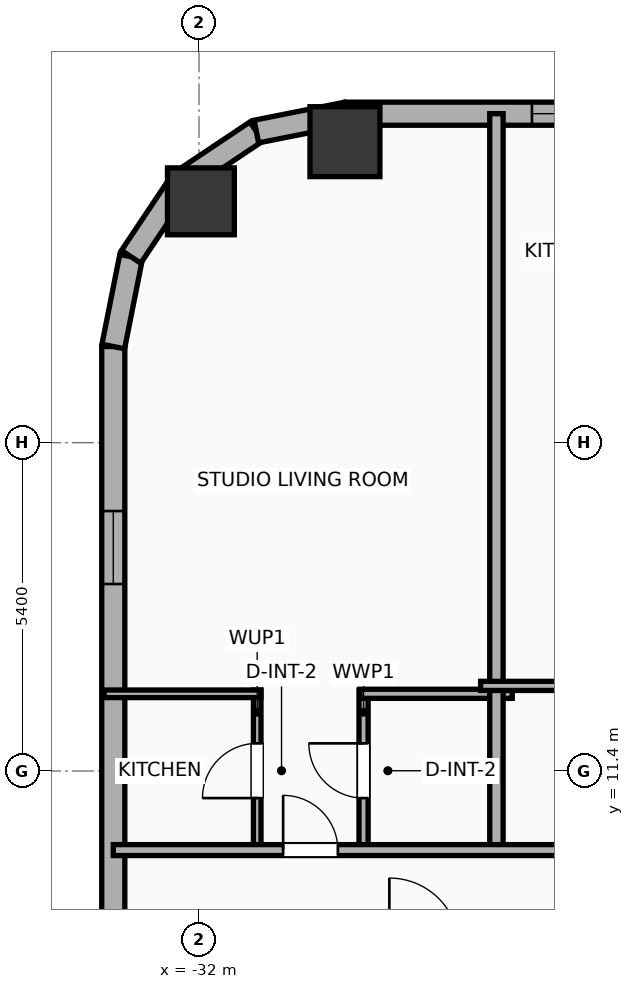
"""IFC4 building model, lengths in metres.
Left out: names, types, materials, properties, quantities, classifications, styles, units other than length and angle.
Written with IfcOpenShell. Run it as: python <this file> out.ifc"""

import sys

from ifc_helpers import new_model, si_unit, direction, frame, frame_2d, origin, origin_2d, place, context, subcontext, project, spatial, rectangle, hollow_rectangle, hollow_circle, extrude, element, fill, save


model = new_model("IFC4")
c1 = context("Model", 3, precision=1e-05, world=origin(), true_north=direction((0.0, 1.0)))
c2 = subcontext(c1, "Body", "Model", "MODEL_VIEW")
j1 = project(units=[si_unit("LENGTHUNIT", "METRE"), si_unit("PLANEANGLEUNIT", "RADIAN")], contexts=[c1])
p1 = place(None, origin())
s1 = spatial("IfcSite", under=j1, at=p1, CompositionType="ELEMENT")
p2 = place(p1, origin())
s2 = spatial("IfcBuilding", under=s1, at=p2, CompositionType="ELEMENT")
p3 = place(p2, frame((0.0, 0.0, 33.8)))
s3 = spatial("IfcBuildingStorey", under=s2, at=p3, CompositionType="ELEMENT", Elevation=33.8)
p4 = place(p3, frame((-29.6, 21.75, 0.0), z_axis=(0.0, 0.0, 1.0), x_axis=(1.0, 0.0, 0.0)))
e1 = element("IfcColumn", 1, at=p4, inside=s3, PredefinedType="COLUMN", context=c2, shape_type="SweptSolid", body=[
    extrude(hollow_rectangle(XDim=1.15, YDim=1.15, WallThickness=0.04, at=origin_2d()), origin(), (0.0, 0.0, 1.0), 3.9),
])
p5 = place(p3, frame((-31.969, 20.769, 0.0), z_axis=(0.0, 0.0, 1.0), x_axis=(1.0, 0.0, 0.0)))
e2 = element("IfcColumn", 2, at=p5, inside=s3, PredefinedType="COLUMN", context=c2, shape_type="SweptSolid", body=[
    extrude(hollow_circle(Radius=0.55, WallThickness=0.036, at=origin_2d()), origin(), (0.0, 0.0, 1.0), 3.9),
])
p6 = place(p3, frame((-33.41, -18.381, 0.0), z_axis=(0.0, 0.0, 1.0), x_axis=(0.0, 1.0, 0.0)))
e3 = element("IfcWall", 3, at=p6, inside=s3, PredefinedType="ELEMENTEDWALL", context=c2, shape_type="SweptSolid", body=[
    extrude(rectangle(XDim=36.763, YDim=0.38, at=frame_2d((18.381, 0.0))), origin(), (0.0, 0.0, 1.0), 3.65),
])
p7 = place(p6, frame((32.857, 0.0, 0.75)))
e4 = element("IfcOpeningElement", 4, at=p7, cuts=e3, PredefinedType="OPENING", context=c2, shape_type="SweptSolid", body=[
    extrude(rectangle(XDim=1.2, YDim=2.05, at=frame_2d((0.6, 1.025))), frame((0.0, 0.2, 0.0), z_axis=(0.0, -1.0, 0.0), x_axis=(1.0, 0.0, 0.0)), (0.0, 0.0, 1.0), 0.4),
])
p8 = place(p6, frame((22.126, 0.0, 0.75)))
e5 = element("IfcOpeningElement", 5, at=p8, cuts=e3, PredefinedType="OPENING", context=c2, shape_type="SweptSolid", body=[
    extrude(rectangle(XDim=1.2, YDim=2.05, at=frame_2d((0.6, 1.025))), frame((0.0, 0.2, 0.0), z_axis=(0.0, -1.0, 0.0), x_axis=(1.0, 0.0, 0.0)), (0.0, 0.0, 1.0), 0.4),
])
p9 = place(p6, frame((13.576, 0.0, 0.75)))
e6 = element("IfcOpeningElement", 6, at=p9, cuts=e3, PredefinedType="OPENING", context=c2, shape_type="SweptSolid", body=[
    extrude(rectangle(XDim=1.2, YDim=2.05, at=frame_2d((0.6, 1.025))), frame((0.0, 0.2, 0.0), z_axis=(0.0, -1.0, 0.0), x_axis=(1.0, 0.0, 0.0)), (0.0, 0.0, 1.0), 0.4),
])
p10 = place(p3, frame((-33.41, 18.381, 0.0), z_axis=(0.0, 0.0, 1.0), x_axis=(0.195086038585, 0.980786132421, 0.0)))
e7 = element("IfcWall", 7, at=p10, inside=s3, PredefinedType="ELEMENTEDWALL", context=c2, shape_type="SweptSolid", body=[
    extrude(rectangle(XDim=1.504, YDim=0.38, at=frame_2d((0.752, 0.0))), origin(), (0.0, 0.0, 1.0), 3.65),
])
p11 = place(p3, frame((-33.116, 19.857, 0.0), z_axis=(0.0, 0.0, 1.0), x_axis=(0.555572577804, 0.831468045563, 0.0)))
e8 = element("IfcWall", 8, at=p11, inside=s3, PredefinedType="ELEMENTEDWALL", context=c2, shape_type="SweptSolid", body=[
    extrude(rectangle(XDim=1.485, YDim=0.38, at=frame_2d((0.742, 0.0))), origin(), (0.0, 0.0, 1.0), 3.65),
])
p12 = place(p3, frame((-32.292, 21.091, 0.0), z_axis=(0.0, 0.0, 1.0), x_axis=(0.831442848281, 0.555610286119, 0.0)))
e9 = element("IfcWall", 9, at=p12, inside=s3, PredefinedType="ELEMENTEDWALL", context=c2, shape_type="SweptSolid", body=[
    extrude(rectangle(XDim=1.485, YDim=0.38, at=frame_2d((0.743, 0.0))), origin(), (0.0, 0.0, 1.0), 3.65),
])
p13 = place(p3, frame((-31.057, 21.917, 0.0), z_axis=(0.0, 0.0, 1.0), x_axis=(0.980786132421, 0.195086038585, 0.0)))
e10 = element("IfcWall", 10, at=p13, inside=s3, PredefinedType="ELEMENTEDWALL", context=c2, shape_type="SweptSolid", body=[
    extrude(rectangle(XDim=1.504, YDim=0.38, at=frame_2d((0.752, 0.0))), origin(), (0.0, 0.0, 1.0), 3.65),
])
p14 = place(p3, frame((-29.581, 22.21, 0.0), z_axis=(0.0, 0.0, 1.0), x_axis=(1.0, 0.0, 0.0)))
e11 = element("IfcWall", 11, at=p14, inside=s3, PredefinedType="ELEMENTEDWALL", context=c2, shape_type="SweptSolid", body=[
    extrude(rectangle(XDim=51.963, YDim=0.38, at=frame_2d((25.981, 0.0))), origin(), (0.0, 0.0, 1.0), 3.65),
])
p15 = place(p14, frame((5.81, 0.0, 0.75)))
e12 = element("IfcOpeningElement", 12, at=p15, cuts=e11, PredefinedType="OPENING", context=c2, shape_type="SweptSolid", body=[
    extrude(rectangle(XDim=2.4, YDim=2.1, at=frame_2d((1.2, 1.05))), frame((0.0, 0.2, 0.0), z_axis=(0.0, -1.0, 0.0), x_axis=(1.0, 0.0, 0.0)), (0.0, 0.0, 1.0), 0.4),
])
p16 = place(p14, frame((23.931, 0.0, 0.75)))
e13 = element("IfcOpeningElement", 13, at=p16, cuts=e11, PredefinedType="OPENING", context=c2, shape_type="SweptSolid", body=[
    extrude(rectangle(XDim=2.4, YDim=2.1, at=frame_2d((1.2, 1.05))), frame((0.0, 0.2, 0.0), z_axis=(0.0, -1.0, 0.0), x_axis=(1.0, 0.0, 0.0)), (0.0, 0.0, 1.0), 0.4),
])
p17 = place(p14, frame((3.056, 0.0, 0.75)))
e14 = element("IfcOpeningElement", 14, at=p17, cuts=e11, PredefinedType="OPENING", context=c2, shape_type="SweptSolid", body=[
    extrude(rectangle(XDim=1.2, YDim=2.05, at=frame_2d((0.6, 1.025))), frame((0.0, 0.2, 0.0), z_axis=(0.0, -1.0, 0.0), x_axis=(1.0, 0.0, 0.0)), (0.0, 0.0, 1.0), 0.4),
])
p18 = place(p14, frame((11.127, 0.0, 0.75)))
e15 = element("IfcOpeningElement", 15, at=p18, cuts=e11, PredefinedType="OPENING", context=c2, shape_type="SweptSolid", body=[
    extrude(rectangle(XDim=0.52, YDim=2.05, at=frame_2d((0.26, 1.025))), frame((0.0, 0.2, 0.0), z_axis=(0.0, -1.0, 0.0), x_axis=(1.0, 0.0, 0.0)), (0.0, 0.0, 1.0), 0.4),
])
p19 = place(p14, frame((14.327, 0.0, 0.75)))
e16 = element("IfcOpeningElement", 16, at=p19, cuts=e11, PredefinedType="OPENING", context=c2, shape_type="SweptSolid", body=[
    extrude(rectangle(XDim=1.2, YDim=2.05, at=frame_2d((0.6, 1.025))), frame((0.0, 0.2, 0.0), z_axis=(0.0, -1.0, 0.0), x_axis=(1.0, 0.0, 0.0)), (0.0, 0.0, 1.0), 0.4),
])
p20 = place(p14, frame((21.641, 0.0, 0.75)))
e17 = element("IfcOpeningElement", 17, at=p20, cuts=e11, PredefinedType="OPENING", context=c2, shape_type="SweptSolid", body=[
    extrude(rectangle(XDim=1.2, YDim=2.05, at=frame_2d((0.6, 1.025))), frame((0.0, 0.2, 0.0), z_axis=(0.0, -1.0, 0.0), x_axis=(1.0, 0.0, 0.0)), (0.0, 0.0, 1.0), 0.4),
])
p21 = place(p14, frame((18.486, 0.0, 0.75)))
e18 = element("IfcOpeningElement", 18, at=p21, cuts=e11, PredefinedType="OPENING", context=c2, shape_type="SweptSolid", body=[
    extrude(rectangle(XDim=1.2, YDim=2.05, at=frame_2d((0.6, 1.025))), frame((0.0, 0.2, 0.0), z_axis=(0.0, -1.0, 0.0), x_axis=(1.0, 0.0, 0.0)), (0.0, 0.0, 1.0), 0.4),
])
p22 = place(p14, frame((28.976, 0.0, 0.75)))
e19 = element("IfcOpeningElement", 19, at=p22, cuts=e11, PredefinedType="OPENING", context=c2, shape_type="SweptSolid", body=[
    extrude(rectangle(XDim=1.2, YDim=2.05, at=frame_2d((0.6, 1.025))), frame((0.0, 0.2, 0.0), z_axis=(0.0, -1.0, 0.0), x_axis=(1.0, 0.0, 0.0)), (0.0, 0.0, 1.0), 0.4),
])
p23 = place(p14, frame((33.476, 0.0, 0.75)))
e20 = element("IfcOpeningElement", 20, at=p23, cuts=e11, PredefinedType="OPENING", context=c2, shape_type="SweptSolid", body=[
    extrude(rectangle(XDim=1.2, YDim=2.05, at=frame_2d((0.6, 1.025))), frame((0.0, 0.2, 0.0), z_axis=(0.0, -1.0, 0.0), x_axis=(1.0, 0.0, 0.0)), (0.0, 0.0, 1.0), 0.4),
])
p24 = place(p14, frame((36.752, 0.0, 0.75)))
e21 = element("IfcOpeningElement", 21, at=p24, cuts=e11, PredefinedType="OPENING", context=c2, shape_type="SweptSolid", body=[
    extrude(rectangle(XDim=1.2, YDim=2.05, at=frame_2d((0.6, 1.025))), frame((0.0, 0.2, 0.0), z_axis=(0.0, -1.0, 0.0), x_axis=(1.0, 0.0, 0.0)), (0.0, 0.0, 1.0), 0.4),
])
p25 = place(p14, frame((42.452, 0.0, 0.75)))
e22 = element("IfcOpeningElement", 22, at=p25, cuts=e11, PredefinedType="OPENING", context=c2, shape_type="SweptSolid", body=[
    extrude(rectangle(XDim=1.2, YDim=2.05, at=frame_2d((0.6, 1.025))), frame((0.0, 0.2, 0.0), z_axis=(0.0, -1.0, 0.0), x_axis=(1.0, 0.0, 0.0)), (0.0, 0.0, 1.0), 0.4),
])
p26 = place(p14, frame((45.831, 0.0, 0.75)))
e23 = element("IfcOpeningElement", 23, at=p26, cuts=e11, PredefinedType="OPENING", context=c2, shape_type="SweptSolid", body=[
    extrude(rectangle(XDim=1.2, YDim=2.05, at=frame_2d((0.6, 1.025))), frame((0.0, 0.2, 0.0), z_axis=(0.0, -1.0, 0.0), x_axis=(1.0, 0.0, 0.0)), (0.0, 0.0, 1.0), 0.4),
])
p27 = place(p14, frame((48.585, 0.0, 0.75)))
e24 = element("IfcOpeningElement", 24, at=p27, cuts=e11, PredefinedType="OPENING", context=c2, shape_type="SweptSolid", body=[
    extrude(rectangle(XDim=1.2, YDim=2.05, at=frame_2d((0.6, 1.025))), frame((0.0, 0.2, 0.0), z_axis=(0.0, -1.0, 0.0), x_axis=(1.0, 0.0, 0.0)), (0.0, 0.0, 1.0), 0.4),
])
p28 = place(p14, frame((50.421, 0.0, 0.75)))
e25 = element("IfcOpeningElement", 25, at=p28, cuts=e11, PredefinedType="OPENING", context=c2, shape_type="SweptSolid", body=[
    extrude(rectangle(XDim=0.52, YDim=2.05, at=frame_2d((0.26, 1.025))), frame((0.0, 0.2, 0.0), z_axis=(0.0, -1.0, 0.0), x_axis=(1.0, 0.0, 0.0)), (0.0, 0.0, 1.0), 0.4),
])
p29 = place(p3, frame((-31.043, 10.08, 0.0), z_axis=(0.0, 0.0, 1.0), x_axis=(0.0, 1.0, 0.0)))
e26 = element("IfcWall", 26, at=p29, inside=s3, PredefinedType="PARTITIONING", context=c2, shape_type="SweptSolid", body=[
    extrude(rectangle(XDim=2.65, YDim=0.125, at=frame_2d((1.325, 0.0))), origin(), (0.0, 0.0, 1.0), 3.65),
])
p30 = place(p29, frame((0.875, 0.0, 0.0)))
e27 = element("IfcOpeningElement", 27, at=p30, cuts=e26, PredefinedType="OPENING", context=c2, shape_type="SweptSolid", body=[
    extrude(rectangle(XDim=0.9, YDim=2.05, at=frame_2d((0.45, 1.025))), frame((0.0, 0.073, 0.0), z_axis=(0.0, -1.0, 0.0), x_axis=(1.0, 0.0, 0.0)), (0.0, 0.0, 1.0), 0.145),
])
p31 = place(p3, frame((-29.294, 10.08, 0.0), z_axis=(0.0, 0.0, 1.0), x_axis=(0.0, 1.0, 0.0)))
e28 = element("IfcWall", 28, at=p31, inside=s3, PredefinedType="PLUMBINGWALL", context=c2, shape_type="SweptSolid", body=[
    extrude(rectangle(XDim=2.65, YDim=0.15, at=frame_2d((1.325, 0.0))), origin(), (0.0, 0.0, 1.0), 3.65),
])
p32 = place(p31, frame((0.875, 0.0, 0.0)))
e29 = element("IfcOpeningElement", 29, at=p32, cuts=e28, PredefinedType="OPENING", context=c2, shape_type="SweptSolid", body=[
    extrude(rectangle(XDim=0.9, YDim=2.05, at=frame_2d((0.45, 1.025))), frame((0.0, 0.085, 0.0), z_axis=(0.0, -1.0, 0.0), x_axis=(1.0, 0.0, 0.0)), (0.0, 0.0, 1.0), 0.17),
])
p33 = place(p3, frame((-33.56, 12.67, 0.0), z_axis=(0.0, 0.0, 1.0), x_axis=(1.0, 0.0, 0.0)))
e30 = element("IfcWall", 30, at=p33, inside=s3, PredefinedType="PARTITIONING", context=c2, shape_type="SweptSolid", body=[
    extrude(rectangle(XDim=2.577, YDim=0.125, at=frame_2d((1.289, 0.0))), origin(), (0.0, 0.0, 1.0), 3.65),
])
p34 = place(p3, frame((-29.354, 12.67, 0.0), z_axis=(0.0, 0.0, 1.0), x_axis=(1.0, 0.0, 0.0)))
e31 = element("IfcWall", 31, at=p34, inside=s3, PredefinedType="PLUMBINGWALL", context=c2, shape_type="SweptSolid", body=[
    extrude(rectangle(XDim=2.505, YDim=0.15, at=frame_2d((1.252, 0.0))), origin(), (0.0, 0.0, 1.0), 3.65),
])
p35 = place(p3, frame((-27.109, 10.02, 0.0), z_axis=(0.0, 0.0, 1.0), x_axis=(0.0, 1.0, 0.0)))
e32 = element("IfcWall", 32, at=p35, inside=s3, PredefinedType="PARTITIONING", context=c2, shape_type="SweptSolid", body=[
    extrude(rectangle(XDim=12.19, YDim=0.22, at=frame_2d((6.095, 0.0))), origin(), (0.0, 0.0, 1.0), 3.65),
])
p36 = place(p3, frame((-27.369, 12.8, 0.0), z_axis=(0.0, 0.0, 1.0), x_axis=(1.0, 0.0, 0.0)))
e33 = element("IfcWall", 33, at=p36, inside=s3, PredefinedType="PLUMBINGWALL", context=c2, shape_type="SweptSolid", body=[
    extrude(rectangle(XDim=2.708, YDim=0.15, at=frame_2d((1.354, 0.0))), origin(), (0.0, 0.0, 1.0), 3.65),
])
p37 = place(p3, frame((-33.41, 10.1, 0.0), z_axis=(0.0, 0.0, 1.0), x_axis=(1.0, 0.0, 0.0)))
e34 = element("IfcWall", 34, at=p37, inside=s3, PredefinedType="PARTITIONING", context=c2, shape_type="SweptSolid", body=[
    extrude(rectangle(XDim=59.62, YDim=0.18, at=frame_2d((29.81, 0.0))), origin(), (0.0, 0.0, 1.0), 3.65),
])
p38 = place(p37, frame((2.793, 0.0, 0.0)))
e35 = element("IfcOpeningElement", 35, at=p38, cuts=e34, PredefinedType="OPENING", context=c2, shape_type="SweptSolid", body=[
    extrude(rectangle(XDim=0.9, YDim=2.05, at=frame_2d((0.45, 1.025))), frame((0.0, 0.1, 0.0), z_axis=(0.0, -1.0, 0.0), x_axis=(1.0, 0.0, 0.0)), (0.0, 0.0, 1.0), 0.2),
])
p39 = place(p37, frame((10.037, 0.0, 0.0)))
e36 = element("IfcOpeningElement", 36, at=p39, cuts=e34, PredefinedType="OPENING", context=c2, shape_type="SweptSolid", body=[
    extrude(rectangle(XDim=1.15, YDim=2.05, at=frame_2d((0.575, 1.025))), frame((0.0, 0.1, 0.0), z_axis=(0.0, -1.0, 0.0), x_axis=(1.0, 0.0, 0.0)), (0.0, 0.0, 1.0), 0.2),
])
p40 = place(p37, frame((16.882, 0.0, 0.0)))
e37 = element("IfcOpeningElement", 37, at=p40, cuts=e34, PredefinedType="OPENING", context=c2, shape_type="SweptSolid", body=[
    extrude(rectangle(XDim=1.15, YDim=2.05, at=frame_2d((0.575, 1.025))), frame((0.0, 0.1, 0.0), z_axis=(0.0, -1.0, 0.0), x_axis=(1.0, 0.0, 0.0)), (0.0, 0.0, 1.0), 0.2),
])
p41 = place(p37, frame((25.801, 0.0, 0.0)))
e38 = element("IfcOpeningElement", 38, at=p41, cuts=e34, PredefinedType="OPENING", context=c2, shape_type="SweptSolid", body=[
    extrude(rectangle(XDim=1.15, YDim=2.05, at=frame_2d((0.575, 1.025))), frame((0.0, 0.1, 0.0), z_axis=(0.0, -1.0, 0.0), x_axis=(1.0, 0.0, 0.0)), (0.0, 0.0, 1.0), 0.2),
])
p42 = place(p37, frame((34.72, 0.0, 0.0)))
e39 = element("IfcOpeningElement", 39, at=p42, cuts=e34, PredefinedType="OPENING", context=c2, shape_type="SweptSolid", body=[
    extrude(rectangle(XDim=1.15, YDim=2.05, at=frame_2d((0.575, 1.025))), frame((0.0, 0.1, 0.0), z_axis=(0.0, -1.0, 0.0), x_axis=(1.0, 0.0, 0.0)), (0.0, 0.0, 1.0), 0.2),
])
p43 = place(p37, frame((43.771, 0.0, 0.0)))
e40 = element("IfcOpeningElement", 40, at=p43, cuts=e34, PredefinedType="OPENING", context=c2, shape_type="SweptSolid", body=[
    extrude(rectangle(XDim=1.15, YDim=2.05, at=frame_2d((0.575, 1.025))), frame((0.0, 0.1, 0.0), z_axis=(0.0, -1.0, 0.0), x_axis=(1.0, 0.0, 0.0)), (0.0, 0.0, 1.0), 0.2),
])
p44 = place(p37, frame((49.715, 0.0, 0.0)))
e41 = element("IfcOpeningElement", 41, at=p44, cuts=e34, PredefinedType="OPENING", context=c2, shape_type="SweptSolid", body=[
    extrude(rectangle(XDim=1.15, YDim=2.05, at=frame_2d((0.575, 1.025))), frame((0.0, 0.1, 0.0), z_axis=(0.0, -1.0, 0.0), x_axis=(1.0, 0.0, 0.0)), (0.0, 0.0, 1.0), 0.2),
])
p45 = place(p37, frame((56.654, 0.0, 0.0)))
e42 = element("IfcOpeningElement", 42, at=p45, cuts=e34, PredefinedType="OPENING", context=c2, shape_type="SweptSolid", body=[
    extrude(rectangle(XDim=0.9, YDim=2.05, at=frame_2d((0.45, 1.025))), frame((0.0, 0.1, 0.0), z_axis=(0.0, -1.0, 0.0), x_axis=(1.0, 0.0, 0.0)), (0.0, 0.0, 1.0), 0.2),
])
p46 = place(p7, origin())
e43 = element("IfcWindow", 43, at=p46, inside=s3, PartitioningType="SINGLE_PANEL", PredefinedType="WINDOW", context=c2, shape_type="SweptSolid", body=[
    extrude(rectangle(XDim=1.2, YDim=2.05, at=frame_2d((0.6, 1.025))), frame((0.0, 0.03, 0.0), z_axis=(0.0, -1.0, 0.0), x_axis=(1.0, 0.0, 0.0)), (0.0, 0.0, 1.0), 0.06),
])
fill(e4, e43)
p47 = place(p17, origin())
e44 = element("IfcWindow", 44, at=p47, inside=s3, PartitioningType="SINGLE_PANEL", PredefinedType="WINDOW", context=c2, shape_type="SweptSolid", body=[
    extrude(rectangle(XDim=1.2, YDim=2.05, at=frame_2d((0.6, 1.025))), frame((0.0, 0.03, 0.0), z_axis=(0.0, -1.0, 0.0), x_axis=(1.0, 0.0, 0.0)), (0.0, 0.0, 1.0), 0.06),
])
fill(e14, e44)
p48 = place(p30, origin())
e45 = element("IfcDoor", 45, at=p48, inside=s3, OperationType="SINGLE_SWING_LEFT", PredefinedType="DOOR", context=c2, shape_type="SweptSolid", body=[
    extrude(rectangle(XDim=0.9, YDim=2.05, at=frame_2d((0.45, 1.025))), frame((0.0, 0.025, 0.0), z_axis=(0.0, -1.0, 0.0), x_axis=(1.0, 0.0, 0.0)), (0.0, 0.0, 1.0), 0.05),
])
fill(e27, e45)
p49 = place(p32, origin())
e46 = element("IfcDoor", 46, at=p49, inside=s3, OperationType="SINGLE_SWING_RIGHT", PredefinedType="DOOR", context=c2, shape_type="SweptSolid", body=[
    extrude(rectangle(XDim=0.9, YDim=2.05, at=frame_2d((0.45, 1.025))), frame((0.0, 0.025, 0.0), z_axis=(0.0, -1.0, 0.0), x_axis=(1.0, 0.0, 0.0)), (0.0, 0.0, 1.0), 0.05),
])
fill(e29, e46)
p50 = place(p38, origin())
e47 = element("IfcDoor", 47, at=p50, inside=s3, OperationType="SINGLE_SWING_LEFT", PredefinedType="DOOR", context=c2, shape_type="SweptSolid", body=[
    extrude(rectangle(XDim=0.9, YDim=2.05, at=frame_2d((0.45, 1.025))), frame((0.0, 0.025, 0.0), z_axis=(0.0, -1.0, 0.0), x_axis=(1.0, 0.0, 0.0)), (0.0, 0.0, 1.0), 0.05),
])
fill(e35, e47)
save(model, sys.argv[1])
